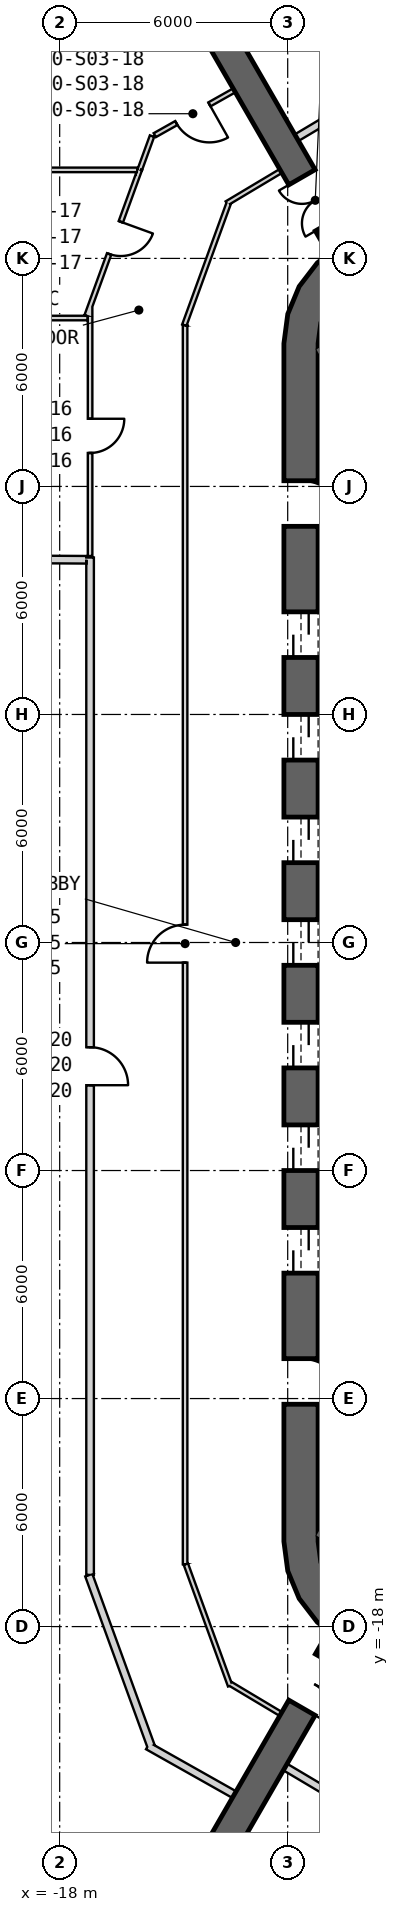
"""IFC4 building model, lengths in metres.
Left out: names, types, materials, properties, quantities, classifications, styles, units other than length and angle.
Written with IfcOpenShell. Run it as: python <this file> out.ifc"""

import sys

from ifc_helpers import new_model, si_unit, direction, frame, frame_2d, origin, place, context, subcontext, project, spatial, polyline, rectangle, outline, extrude, element, fill, save


model = new_model("IFC4")
c1 = context("Model", 3, precision=1e-05, world=origin(), true_north=direction((0.0, 1.0)))
c2 = subcontext(c1, "Body", "Model", "MODEL_VIEW")
j1 = project(units=[si_unit("LENGTHUNIT", "METRE"), si_unit("PLANEANGLEUNIT", "RADIAN")], contexts=[c1])
p1 = place(None, origin())
s1 = spatial("IfcSite", under=j1, at=p1, CompositionType="ELEMENT")
p2 = place(p1, origin())
s2 = spatial("IfcBuilding", under=s1, at=p2, CompositionType="ELEMENT")
p3 = place(p2, frame((0.0, 0.0, 82.4)))
s3 = spatial("IfcBuildingStorey", under=s2, at=p3, CompositionType="ELEMENT", Elevation=82.4)
p4 = place(p3, frame((-11.65, 15.762, 0.0), z_axis=(0.0, 0.0, 1.0), x_axis=(0.0, -1.0, 0.0)))
e1 = element("IfcWall", 1, at=p4, inside=s3, PredefinedType="SHEAR", context=c2, shape_type="SweptSolid", body=[
    extrude(rectangle(XDim=31.523, YDim=0.9, at=frame_2d((15.762, 0.0))), origin(), (0.0, 0.0, 1.0), 4.1),
])
p5 = place(p4, frame((7.062, 0.0, 0.0)))
e2 = element("IfcOpeningElement", 2, at=p5, cuts=e1, PredefinedType="OPENING", context=c2, shape_type="SweptSolid", body=[
    extrude(rectangle(XDim=1.2, YDim=2.4, at=frame_2d((0.6, 1.2))), frame((0.0, 0.46, 0.0), z_axis=(0.0, -1.0, 0.0), x_axis=(1.0, 0.0, 0.0)), (0.0, 0.0, 1.0), 0.92),
])
p6 = place(p4, frame((9.762, 0.0, 0.0)))
e3 = element("IfcOpeningElement", 3, at=p6, cuts=e1, PredefinedType="OPENING", context=c2, shape_type="SweptSolid", body=[
    extrude(rectangle(XDim=1.2, YDim=2.4, at=frame_2d((0.6, 1.2))), frame((0.0, 0.46, 0.0), z_axis=(0.0, -1.0, 0.0), x_axis=(1.0, 0.0, 0.0)), (0.0, 0.0, 1.0), 0.92),
])
p7 = place(p4, frame((12.462, 0.0, 0.0)))
e4 = element("IfcOpeningElement", 4, at=p7, cuts=e1, PredefinedType="OPENING", context=c2, shape_type="SweptSolid", body=[
    extrude(rectangle(XDim=1.2, YDim=2.4, at=frame_2d((0.6, 1.2))), frame((0.0, 0.46, 0.0), z_axis=(0.0, -1.0, 0.0), x_axis=(1.0, 0.0, 0.0)), (0.0, 0.0, 1.0), 0.92),
])
p8 = place(p4, frame((15.162, 0.0, 0.0)))
e5 = element("IfcOpeningElement", 5, at=p8, cuts=e1, PredefinedType="OPENING", context=c2, shape_type="SweptSolid", body=[
    extrude(rectangle(XDim=1.2, YDim=2.4, at=frame_2d((0.6, 1.2))), frame((0.0, 0.46, 0.0), z_axis=(0.0, -1.0, 0.0), x_axis=(1.0, 0.0, 0.0)), (0.0, 0.0, 1.0), 0.92),
])
p9 = place(p4, frame((17.862, 0.0, 0.0)))
e6 = element("IfcOpeningElement", 6, at=p9, cuts=e1, PredefinedType="OPENING", context=c2, shape_type="SweptSolid", body=[
    extrude(rectangle(XDim=1.2, YDim=2.4, at=frame_2d((0.6, 1.2))), frame((0.0, 0.46, 0.0), z_axis=(0.0, -1.0, 0.0), x_axis=(1.0, 0.0, 0.0)), (0.0, 0.0, 1.0), 0.92),
])
p10 = place(p4, frame((20.562, 0.0, 0.0)))
e7 = element("IfcOpeningElement", 7, at=p10, cuts=e1, PredefinedType="OPENING", context=c2, shape_type="SweptSolid", body=[
    extrude(rectangle(XDim=1.2, YDim=2.4, at=frame_2d((0.6, 1.2))), frame((0.0, 0.46, 0.0), z_axis=(0.0, -1.0, 0.0), x_axis=(1.0, 0.0, 0.0)), (0.0, 0.0, 1.0), 0.92),
])
p11 = place(p4, frame((23.262, 0.0, 0.0)))
e8 = element("IfcOpeningElement", 8, at=p11, cuts=e1, PredefinedType="OPENING", context=c2, shape_type="SweptSolid", body=[
    extrude(rectangle(XDim=1.2, YDim=2.4, at=frame_2d((0.6, 1.2))), frame((0.0, 0.46, 0.0), z_axis=(0.0, -1.0, 0.0), x_axis=(1.0, 0.0, 0.0)), (0.0, 0.0, 1.0), 0.92),
])
p12 = place(p4, frame((3.612, 0.0, 0.0)))
e9 = element("IfcOpeningElement", 9, at=p12, cuts=e1, PredefinedType="OPENING", context=c2, shape_type="SweptSolid", body=[
    extrude(rectangle(XDim=1.2, YDim=2.4, at=frame_2d((0.6, 1.2))), frame((0.0, 0.46, 0.0), z_axis=(0.0, -1.0, 0.0), x_axis=(1.0, 0.0, 0.0)), (0.0, 0.0, 1.0), 0.92),
])
p13 = place(p4, frame((26.712, 0.0, 0.0)))
e10 = element("IfcOpeningElement", 10, at=p13, cuts=e1, PredefinedType="OPENING", context=c2, shape_type="SweptSolid", body=[
    extrude(rectangle(XDim=1.2, YDim=2.4, at=frame_2d((0.6, 1.2))), frame((0.0, 0.46, 0.0), z_axis=(0.0, -1.0, 0.0), x_axis=(1.0, 0.0, 0.0)), (0.0, 0.0, 1.0), 0.92),
])
p14 = place(p3, origin())
e11 = element("IfcWall", 11, at=p14, inside=s3, PredefinedType="SHEAR", context=c2, shape_type="SweptSolid", body=[
    extrude(outline(polyline([(-7.6, 18.36), (-8.323, 18.659), (-9.1, 18.762), (-9.876, 18.659), (-10.6, 18.36), (-11.221, 17.883), (-11.698, 17.262), (-11.998, 16.538), (-12.1, 15.762), (-11.2, 15.762), (-11.128, 16.305), (-10.919, 16.812), (-10.585, 17.247), (-10.15, 17.58), (-9.644, 17.79), (-9.1, 17.862), (-8.556, 17.79), (-8.05, 17.58), (-7.6, 18.36)])), origin(), (0.0, 0.0, 1.0), 4.1),
])
p15 = place(p3, origin())
e12 = element("IfcWall", 12, at=p15, inside=s3, PredefinedType="SHEAR", context=c2, shape_type="SweptSolid", body=[
    extrude(outline(polyline([(-12.1, -15.762), (-11.998, -16.538), (-11.698, -17.262), (-11.221, -17.883), (-10.6, -18.36), (-9.876, -18.659), (-9.1, -18.762), (-8.323, -18.659), (-7.6, -18.36), (-8.05, -17.58), (-8.556, -17.79), (-9.1, -17.862), (-9.644, -17.79), (-10.15, -17.58), (-10.585, -17.247), (-10.919, -16.812), (-11.128, -16.305), (-11.2, -15.762), (-12.1, -15.762)])), origin(), (0.0, 0.0, 1.0), 4.1),
])
p16 = place(p3, frame((-10.575, 18.316, 0.0), z_axis=(0.0, 0.0, 1.0), x_axis=(-0.499995223427, 0.866028161523, 0.0)))
e13 = element("IfcWall", 13, at=p16, inside=s3, PredefinedType="SHEAR", context=c2, shape_type="SweptSolid", body=[
    extrude(rectangle(XDim=13.455, YDim=0.8, at=frame_2d((6.728, 0.0))), origin(), (0.0, 0.0, 1.0), 4.1),
])
p17 = place(p16, frame((0.7, 0.0, 0.0)))
e14 = element("IfcOpeningElement", 14, at=p17, cuts=e13, PredefinedType="OPENING", context=c2, shape_type="SweptSolid", body=[
    extrude(rectangle(XDim=1.4, YDim=2.4, at=frame_2d((0.7, 1.2))), frame((0.0, 0.41, 0.0), z_axis=(0.0, -1.0, 0.0), x_axis=(1.0, 0.0, 0.0)), (0.0, 0.0, 1.0), 0.82),
])
p18 = place(p3, frame((-10.575, -18.316, 0.0), z_axis=(0.0, 0.0, 1.0), x_axis=(-0.499995223427, -0.866028161523, 0.0)))
e15 = element("IfcWall", 15, at=p18, inside=s3, PredefinedType="SHEAR", context=c2, shape_type="SweptSolid", body=[
    extrude(rectangle(XDim=13.455, YDim=0.8, at=frame_2d((6.728, 0.0))), origin(), (0.0, 0.0, 1.0), 4.1),
])
p19 = place(p18, frame((0.7, 0.0, 0.0)))
e16 = element("IfcOpeningElement", 16, at=p19, cuts=e15, PredefinedType="OPENING", context=c2, shape_type="SweptSolid", body=[
    extrude(rectangle(XDim=1.4, YDim=2.4, at=frame_2d((0.7, 1.2))), frame((0.0, 0.41, 0.0), z_axis=(0.0, -1.0, 0.0), x_axis=(1.0, 0.0, 0.0)), (0.0, 0.0, 1.0), 0.82),
])
p20 = place(p3, frame((-11.2, 9.42, 0.0), z_axis=(0.0, 0.0, 1.0), x_axis=(0.999957167047, 0.009255488683, 0.0)))
e17 = element("IfcWall", 17, at=p20, inside=s3, PredefinedType="PLUMBINGWALL", context=c2, shape_type="SweptSolid", body=[
    extrude(rectangle(XDim=3.35, YDim=0.2, at=frame_2d((1.675, 0.0))), origin(), (0.0, 0.0, 1.0), 3.8),
])
p21 = place(p3, frame((-8.05, -9.449, 0.0), z_axis=(0.0, 0.0, 1.0), x_axis=(-0.999957467379, 0.009222983926, 0.0)))
e18 = element("IfcWall", 18, at=p21, inside=s3, PredefinedType="PLUMBINGWALL", context=c2, shape_type="SweptSolid", body=[
    extrude(rectangle(XDim=3.15, YDim=0.2, at=frame_2d((1.575, 0.0))), origin(), (0.0, 0.0, 1.0), 3.8),
])
p22 = place(p3, frame((-11.245, 15.678, -0.3), z_axis=(0.0, 0.0, 1.0), x_axis=(0.499977274689, -0.866038523851, 0.0)))
e19 = element("IfcWall", 19, at=p22, inside=s3, PredefinedType="SHEAR", context=c2, shape_type="SweptSolid", body=[
    extrude(rectangle(XDim=8.1, YDim=0.2, at=frame_2d((4.05, 0.0))), origin(), (0.0, 0.0, 1.0), 4.1),
])
p23 = place(p3, frame((-11.282, -15.541, -0.3), z_axis=(0.0, 0.0, 1.0), x_axis=(0.866000483506, -0.500043160704, 0.0)))
e20 = element("IfcWall", 20, at=p23, inside=s3, PredefinedType="SHEAR", context=c2, shape_type="SweptSolid", body=[
    extrude(rectangle(XDim=3.8, YDim=0.2, at=frame_2d((1.9, 0.0))), origin(), (0.0, 0.0, 1.0), 4.1),
])
p24 = place(p3, frame((-7.196, -8.663, -0.3), z_axis=(0.0, 0.0, 1.0), x_axis=(-0.499997992926, -0.866026562566, 0.0)))
e21 = element("IfcWall", 21, at=p24, inside=s3, PredefinedType="SHEAR", context=c2, shape_type="SweptSolid", body=[
    extrude(rectangle(XDim=7.9, YDim=0.2, at=frame_2d((3.95, 0.0))), origin(), (0.0, 0.0, 1.0), 4.1),
])
p25 = place(p3, frame((-12.181, 20.299, 0.0), z_axis=(0.0, 0.0, 1.0), x_axis=(-0.8583241935, -0.51310776534, 0.0)))
e22 = element("IfcWall", 22, at=p25, inside=s3, PredefinedType="PARTITIONING", context=c2, shape_type="SweptSolid", body=[
    extrude(rectangle(XDim=1.656, YDim=0.12, at=frame_2d((0.828, 0.0))), origin(), (0.0, 0.0, 1.0), 3.8),
])
p26 = place(p3, frame((-13.549, 19.461, 0.0), z_axis=(0.0, 0.0, 1.0), x_axis=(-0.341989191955, -0.939703885586, 0.0)))
e23 = element("IfcWall", 23, at=p26, inside=s3, PredefinedType="PARTITIONING", context=c2, shape_type="SweptSolid", body=[
    extrude(rectangle(XDim=3.425, YDim=0.12, at=frame_2d((1.712, 0.0))), origin(), (0.0, 0.0, 1.0), 2.88),
])
p27 = place(p3, frame((-14.7, -16.359, 0.0), z_axis=(0.0, 0.0, 1.0), x_axis=(0.0, 1.0, 0.0)))
e24 = element("IfcWall", 24, at=p27, inside=s3, PredefinedType="PARTITIONING", context=c2, shape_type="SweptSolid", body=[
    extrude(rectangle(XDim=32.599, YDim=0.12, at=frame_2d((16.299, 0.0))), origin(), (0.0, 0.0, 1.0), 2.98),
])
p28 = place(p27, frame((15.83, 0.0, 0.0)))
e25 = element("IfcOpeningElement", 25, at=p28, cuts=e24, PredefinedType="OPENING", context=c2, shape_type="SweptSolid", body=[
    extrude(rectangle(XDim=1.0, YDim=2.1, at=frame_2d((0.5, 1.05))), frame((0.0, 0.07, 0.0), z_axis=(0.0, -1.0, 0.0), x_axis=(1.0, 0.0, 0.0)), (0.0, 0.0, 1.0), 0.14),
])
p29 = place(p3, frame((-14.679, -16.356, 0.0), z_axis=(0.0, 0.0, 1.0), x_axis=(0.342002052592, -0.939699205077, 0.0)))
e26 = element("IfcWall", 26, at=p29, inside=s3, PredefinedType="PARTITIONING", context=c2, shape_type="SweptSolid", body=[
    extrude(rectangle(XDim=3.406, YDim=0.12, at=frame_2d((1.703, 0.0))), origin(), (0.0, 0.0, 1.0), 2.88),
])
p30 = place(p3, frame((-13.516, -19.501, 0.0), z_axis=(0.0, 0.0, 1.0), x_axis=(0.858336816023, -0.513086649856, 0.0)))
e27 = element("IfcWall", 27, at=p30, inside=s3, PredefinedType="PARTITIONING", context=c2, shape_type="SweptSolid", body=[
    extrude(rectangle(XDim=1.555, YDim=0.12, at=frame_2d((0.777, 0.0))), origin(), (0.0, 0.0, 1.0), 3.8),
])
p31 = place(p3, frame((-15.679, -21.14, 0.0), z_axis=(0.0, 0.0, 1.0), x_axis=(0.871170402172, -0.490980784124, 0.0)))
e28 = element("IfcWall", 28, at=p31, inside=s3, PredefinedType="PARTITIONING", context=c2, shape_type="SweptSolid", body=[
    extrude(rectangle(XDim=2.609, YDim=0.2, at=frame_2d((1.305, 0.0))), origin(), (0.0, 0.0, 1.0), 3.8),
])
p32 = place(p3, frame((-17.234, -16.646, 0.0), z_axis=(0.0, 0.0, 1.0), x_axis=(0.342004731639, -0.939698230038, 0.0)))
e29 = element("IfcWall", 29, at=p32, inside=s3, PredefinedType="PARTITIONING", context=c2, shape_type="SweptSolid", body=[
    extrude(rectangle(XDim=4.794, YDim=0.2, at=frame_2d((2.397, 0.0))), origin(), (0.0, 0.0, 1.0), 2.88),
])
p33 = place(p3, frame((-17.2, 10.13, 0.0), z_axis=(0.0, 0.0, 1.0), x_axis=(0.0, -1.0, 0.0)))
e30 = element("IfcWall", 30, at=p33, inside=s3, PredefinedType="PARTITIONING", context=c2, shape_type="SweptSolid", body=[
    extrude(rectangle(XDim=26.77, YDim=0.2, at=frame_2d((13.385, 0.0))), origin(), (0.0, 0.0, 1.0), 2.98),
])
p34 = place(p33, frame((12.885, 0.0, 0.0)))
e31 = element("IfcOpeningElement", 31, at=p34, cuts=e30, PredefinedType="OPENING", context=c2, shape_type="SweptSolid", body=[
    extrude(rectangle(XDim=1.0, YDim=2.1, at=frame_2d((0.5, 1.05))), frame((0.0, 0.11, 0.0), z_axis=(0.0, -1.0, 0.0), x_axis=(1.0, 0.0, 0.0)), (0.0, 0.0, 1.0), 0.22),
])
p35 = place(p3, frame((-17.2, 16.74, 0.0), z_axis=(0.0, 0.0, 1.0), x_axis=(0.0, -1.0, 0.0)))
e32 = element("IfcWall", 32, at=p35, inside=s3, PredefinedType="PARTITIONING", context=c2, shape_type="SweptSolid", body=[
    extrude(rectangle(XDim=6.57, YDim=0.12, at=frame_2d((3.285, 0.0))), origin(), (0.0, 0.0, 1.0), 2.98),
])
p36 = place(p35, frame((2.96, 0.0, 0.0)))
e33 = element("IfcOpeningElement", 33, at=p36, cuts=e32, PredefinedType="OPENING", context=c2, shape_type="SweptSolid", body=[
    extrude(rectangle(XDim=0.9, YDim=2.1, at=frame_2d((0.45, 1.05))), frame((0.0, 0.07, 0.0), z_axis=(0.0, -1.0, 0.0), x_axis=(1.0, 0.0, 0.0)), (0.0, 0.0, 1.0), 0.14),
])
p37 = place(p3, frame((-15.57, 21.218, 0.0), z_axis=(0.0, 0.0, 1.0), x_axis=(-0.342015355476, -0.939694363407, 0.0)))
e34 = element("IfcWall", 34, at=p37, inside=s3, PredefinedType="PARTITIONING", context=c2, shape_type="SweptSolid", body=[
    extrude(rectangle(XDim=0.936, YDim=0.12, at=frame_2d((0.468, 0.0))), origin(), (0.0, 0.0, 1.0), 2.88),
])
p38 = place(p3, frame((-15.89, 20.339, 0.0), z_axis=(0.0, 0.0, 1.0), x_axis=(-0.341977654868, -0.939708084232, 0.0)))
e35 = element("IfcWall", 35, at=p38, inside=s3, PredefinedType="PARTITIONING", context=c2, shape_type="SweptSolid", body=[
    extrude(rectangle(XDim=4.094, YDim=0.12, at=frame_2d((2.047, 0.0))), origin(), (0.0, 0.0, 1.0), 2.88),
])
p39 = place(p38, frame((1.465, 0.0, 0.0)))
e36 = element("IfcOpeningElement", 36, at=p39, cuts=e35, PredefinedType="OPENING", context=c2, shape_type="SweptSolid", body=[
    extrude(rectangle(XDim=0.9, YDim=2.1, at=frame_2d((0.45, 1.05))), frame((0.0, 0.07, 0.0), z_axis=(0.0, -1.0, 0.0), x_axis=(1.0, 0.0, 0.0)), (0.0, 0.0, 1.0), 0.14),
])
p40 = place(p3, frame((-13.406, 22.421, 0.0), z_axis=(0.0, 0.0, 1.0), x_axis=(-0.87117593963, -0.490970958622, 0.0)))
e37 = element("IfcWall", 37, at=p40, inside=s3, PredefinedType="PARTITIONING", context=c2, shape_type="SweptSolid", body=[
    extrude(rectangle(XDim=2.4, YDim=0.12, at=frame_2d((1.2, 0.0))), origin(), (0.0, 0.0, 1.0), 3.8),
])
p41 = place(p40, frame((0.75, 0.0, 0.0)))
e38 = element("IfcOpeningElement", 38, at=p41, cuts=e37, PredefinedType="OPENING", context=c2, shape_type="SweptSolid", body=[
    extrude(rectangle(XDim=1.0, YDim=2.1, at=frame_2d((0.5, 1.05))), frame((0.0, 0.07, 0.0), z_axis=(0.0, -1.0, 0.0), x_axis=(1.0, 0.0, 0.0)), (0.0, 0.0, 1.0), 0.14),
])
p42 = place(p3, frame((-10.118, 22.157, 0.0), z_axis=(0.0, 0.0, 1.0), x_axis=(-0.859118225537, -0.511777172752, 0.0)))
e39 = element("IfcWall", 39, at=p42, inside=s3, PredefinedType="PARTITIONING", context=c2, shape_type="SweptSolid", body=[
    extrude(rectangle(XDim=1.917, YDim=0.2, at=frame_2d((0.958, 0.0))), origin(), (0.0, 0.0, 1.0), 3.8),
])
p43 = place(p3, frame((-12.064, -21.696, 0.0), z_axis=(0.0, 0.0, 1.0), x_axis=(0.859769731383, -0.510681905885, 0.0)))
e40 = element("IfcWall", 40, at=p43, inside=s3, PredefinedType="PARTITIONING", context=c2, shape_type="SweptSolid", body=[
    extrude(rectangle(XDim=1.97, YDim=0.2, at=frame_2d((0.985, 0.0))), origin(), (0.0, 0.0, 1.0), 3.8),
])
p44 = place(p3, frame((-17.3, 10.071, 0.0), z_axis=(0.0, 0.0, 1.0), x_axis=(-0.999983200532, 0.005796434527, 0.0)))
e41 = element("IfcWall", 41, at=p44, inside=s3, PredefinedType="PARTITIONING", context=c2, shape_type="SweptSolid", body=[
    extrude(rectangle(XDim=4.97, YDim=0.2, at=frame_2d((2.485, 0.0))), origin(), (0.0, 0.0, 1.0), 3.8),
])
p45 = place(p3, frame((-17.26, 16.431, 0.0), z_axis=(0.0, 0.0, 1.0), x_axis=(-1.0, 0.0, 0.0)))
e42 = element("IfcWall", 42, at=p45, inside=s3, PredefinedType="PARTITIONING", context=c2, shape_type="SweptSolid", body=[
    extrude(rectangle(XDim=5.01, YDim=0.12, at=frame_2d((2.505, 0.0))), origin(), (0.0, 0.0, 1.0), 2.98),
])
p46 = place(p3, frame((-22.27, 20.329, 0.0), z_axis=(0.0, 0.0, 1.0), x_axis=(1.0, 0.0, 0.0)))
e43 = element("IfcWall", 43, at=p46, inside=s3, PredefinedType="PARTITIONING", context=c2, shape_type="SweptSolid", body=[
    extrude(rectangle(XDim=6.312, YDim=0.12, at=frame_2d((3.156, 0.0))), origin(), (0.0, 0.0, 1.0), 2.88),
])
p47 = place(p28, origin())
e44 = element("IfcDoor", 44, at=p47, inside=s3, OperationType="SINGLE_SWING_RIGHT", PredefinedType="NOTDEFINED", context=c2, shape_type="SweptSolid", body=[
    extrude(rectangle(XDim=1.0, YDim=2.1, at=frame_2d((0.5, 1.05))), frame((0.0, 0.025, 0.0), z_axis=(0.0, -1.0, 0.0), x_axis=(1.0, 0.0, 0.0)), (0.0, 0.0, 1.0), 0.05),
])
fill(e25, e44)
p48 = place(p36, origin())
e45 = element("IfcDoor", 45, at=p48, inside=s3, OperationType="SINGLE_SWING_RIGHT", PredefinedType="NOTDEFINED", context=c2, shape_type="SweptSolid", body=[
    extrude(rectangle(XDim=0.9, YDim=2.1, at=frame_2d((0.45, 1.05))), frame((0.0, 0.025, 0.0), z_axis=(0.0, -1.0, 0.0), x_axis=(1.0, 0.0, 0.0)), (0.0, 0.0, 1.0), 0.05),
])
fill(e33, e45)
p49 = place(p39, origin())
e46 = element("IfcDoor", 46, at=p49, inside=s3, OperationType="SINGLE_SWING_LEFT", PredefinedType="NOTDEFINED", context=c2, shape_type="SweptSolid", body=[
    extrude(rectangle(XDim=0.9, YDim=2.1, at=frame_2d((0.45, 1.05))), frame((0.0, 0.025, 0.0), z_axis=(0.0, -1.0, 0.0), x_axis=(1.0, 0.0, 0.0)), (0.0, 0.0, 1.0), 0.05),
])
fill(e36, e46)
p50 = place(p41, origin())
e47 = element("IfcDoor", 47, at=p50, inside=s3, OperationType="SINGLE_SWING_LEFT", PredefinedType="NOTDEFINED", context=c2, shape_type="SweptSolid", body=[
    extrude(rectangle(XDim=1.0, YDim=2.1, at=frame_2d((0.5, 1.05))), frame((0.0, 0.025, 0.0), z_axis=(0.0, -1.0, 0.0), x_axis=(1.0, 0.0, 0.0)), (0.0, 0.0, 1.0), 0.05),
])
fill(e38, e47)
p51 = place(p34, origin())
e48 = element("IfcDoor", 48, at=p51, inside=s3, OperationType="SINGLE_SWING_RIGHT", PredefinedType="USERDEFINED", context=c2, shape_type="SweptSolid", body=[
    extrude(rectangle(XDim=1.0, YDim=2.1, at=frame_2d((0.5, 1.05))), frame((0.0, 0.025, 0.0), z_axis=(0.0, -1.0, 0.0), x_axis=(1.0, 0.0, 0.0)), (0.0, 0.0, 1.0), 0.05),
])
fill(e31, e48)
p52 = place(p5, origin())
e49 = element("IfcDoor", 49, at=p52, inside=s3, OperationType="SLIDING_TO_LEFT", PredefinedType="USERDEFINED", context=c2, shape_type="SweptSolid", body=[
    extrude(rectangle(XDim=1.2, YDim=2.4, at=frame_2d((0.6, 1.2))), frame((0.0, 0.025, 0.0), z_axis=(0.0, -1.0, 0.0), x_axis=(1.0, 0.0, 0.0)), (0.0, 0.0, 1.0), 0.05),
])
fill(e2, e49)
p53 = place(p6, origin())
e50 = element("IfcDoor", 50, at=p53, inside=s3, OperationType="SLIDING_TO_LEFT", PredefinedType="USERDEFINED", context=c2, shape_type="SweptSolid", body=[
    extrude(rectangle(XDim=1.2, YDim=2.4, at=frame_2d((0.6, 1.2))), frame((0.0, 0.025, 0.0), z_axis=(0.0, -1.0, 0.0), x_axis=(1.0, 0.0, 0.0)), (0.0, 0.0, 1.0), 0.05),
])
fill(e3, e50)
p54 = place(p7, origin())
e51 = element("IfcDoor", 51, at=p54, inside=s3, OperationType="SLIDING_TO_LEFT", PredefinedType="USERDEFINED", context=c2, shape_type="SweptSolid", body=[
    extrude(rectangle(XDim=1.2, YDim=2.4, at=frame_2d((0.6, 1.2))), frame((0.0, 0.025, 0.0), z_axis=(0.0, -1.0, 0.0), x_axis=(1.0, 0.0, 0.0)), (0.0, 0.0, 1.0), 0.05),
])
fill(e4, e51)
p55 = place(p8, origin())
e52 = element("IfcDoor", 52, at=p55, inside=s3, OperationType="SLIDING_TO_LEFT", PredefinedType="USERDEFINED", context=c2, shape_type="SweptSolid", body=[
    extrude(rectangle(XDim=1.2, YDim=2.4, at=frame_2d((0.6, 1.2))), frame((0.0, 0.025, 0.0), z_axis=(0.0, -1.0, 0.0), x_axis=(1.0, 0.0, 0.0)), (0.0, 0.0, 1.0), 0.05),
])
fill(e5, e52)
p56 = place(p9, origin())
e53 = element("IfcDoor", 53, at=p56, inside=s3, OperationType="SLIDING_TO_LEFT", PredefinedType="USERDEFINED", context=c2, shape_type="SweptSolid", body=[
    extrude(rectangle(XDim=1.2, YDim=2.4, at=frame_2d((0.6, 1.2))), frame((0.0, 0.025, 0.0), z_axis=(0.0, -1.0, 0.0), x_axis=(1.0, 0.0, 0.0)), (0.0, 0.0, 1.0), 0.05),
])
fill(e6, e53)
p57 = place(p10, origin())
e54 = element("IfcDoor", 54, at=p57, inside=s3, OperationType="SLIDING_TO_LEFT", PredefinedType="USERDEFINED", context=c2, shape_type="SweptSolid", body=[
    extrude(rectangle(XDim=1.2, YDim=2.4, at=frame_2d((0.6, 1.2))), frame((0.0, 0.025, 0.0), z_axis=(0.0, -1.0, 0.0), x_axis=(1.0, 0.0, 0.0)), (0.0, 0.0, 1.0), 0.05),
])
fill(e7, e54)
p58 = place(p11, origin())
e55 = element("IfcDoor", 55, at=p58, inside=s3, OperationType="SLIDING_TO_LEFT", PredefinedType="USERDEFINED", context=c2, shape_type="SweptSolid", body=[
    extrude(rectangle(XDim=1.2, YDim=2.4, at=frame_2d((0.6, 1.2))), frame((0.0, 0.025, 0.0), z_axis=(0.0, -1.0, 0.0), x_axis=(1.0, 0.0, 0.0)), (0.0, 0.0, 1.0), 0.05),
])
fill(e8, e55)
p59 = place(p12, origin())
e56 = element("IfcDoor", 56, at=p59, inside=s3, OperationType="SINGLE_SWING_LEFT", PredefinedType="USERDEFINED", context=c2, shape_type="SweptSolid", body=[
    extrude(rectangle(XDim=1.2, YDim=2.4, at=frame_2d((0.6, 1.2))), frame((0.0, 0.025, 0.0), z_axis=(0.0, -1.0, 0.0), x_axis=(1.0, 0.0, 0.0)), (0.0, 0.0, 1.0), 0.05),
])
fill(e9, e56)
p60 = place(p13, origin())
e57 = element("IfcDoor", 57, at=p60, inside=s3, OperationType="SINGLE_SWING_RIGHT", PredefinedType="USERDEFINED", context=c2, shape_type="SweptSolid", body=[
    extrude(rectangle(XDim=1.2, YDim=2.4, at=frame_2d((0.6, 1.2))), frame((0.0, 0.025, 0.0), z_axis=(0.0, -1.0, 0.0), x_axis=(1.0, 0.0, 0.0)), (0.0, 0.0, 1.0), 0.05),
])
fill(e10, e57)
p61 = place(p17, origin())
e58 = element("IfcDoor", 58, at=p61, inside=s3, OperationType="DOUBLE_DOOR_SINGLE_SWING", PredefinedType="NOTDEFINED", context=c2, shape_type="SweptSolid", body=[
    extrude(rectangle(XDim=1.4, YDim=2.4, at=frame_2d((0.7, 1.2))), frame((0.0, 0.025, 0.0), z_axis=(0.0, -1.0, 0.0), x_axis=(1.0, 0.0, 0.0)), (0.0, 0.0, 1.0), 0.05),
])
fill(e14, e58)
p62 = place(p19, origin())
e59 = element("IfcDoor", 59, at=p62, inside=s3, OperationType="DOUBLE_DOOR_SINGLE_SWING", PredefinedType="NOTDEFINED", context=c2, shape_type="SweptSolid", body=[
    extrude(rectangle(XDim=1.4, YDim=2.4, at=frame_2d((0.7, 1.2))), frame((0.0, 0.025, 0.0), z_axis=(0.0, -1.0, 0.0), x_axis=(1.0, 0.0, 0.0)), (0.0, 0.0, 1.0), 0.05),
])
fill(e16, e59)
save(model, sys.argv[1])
